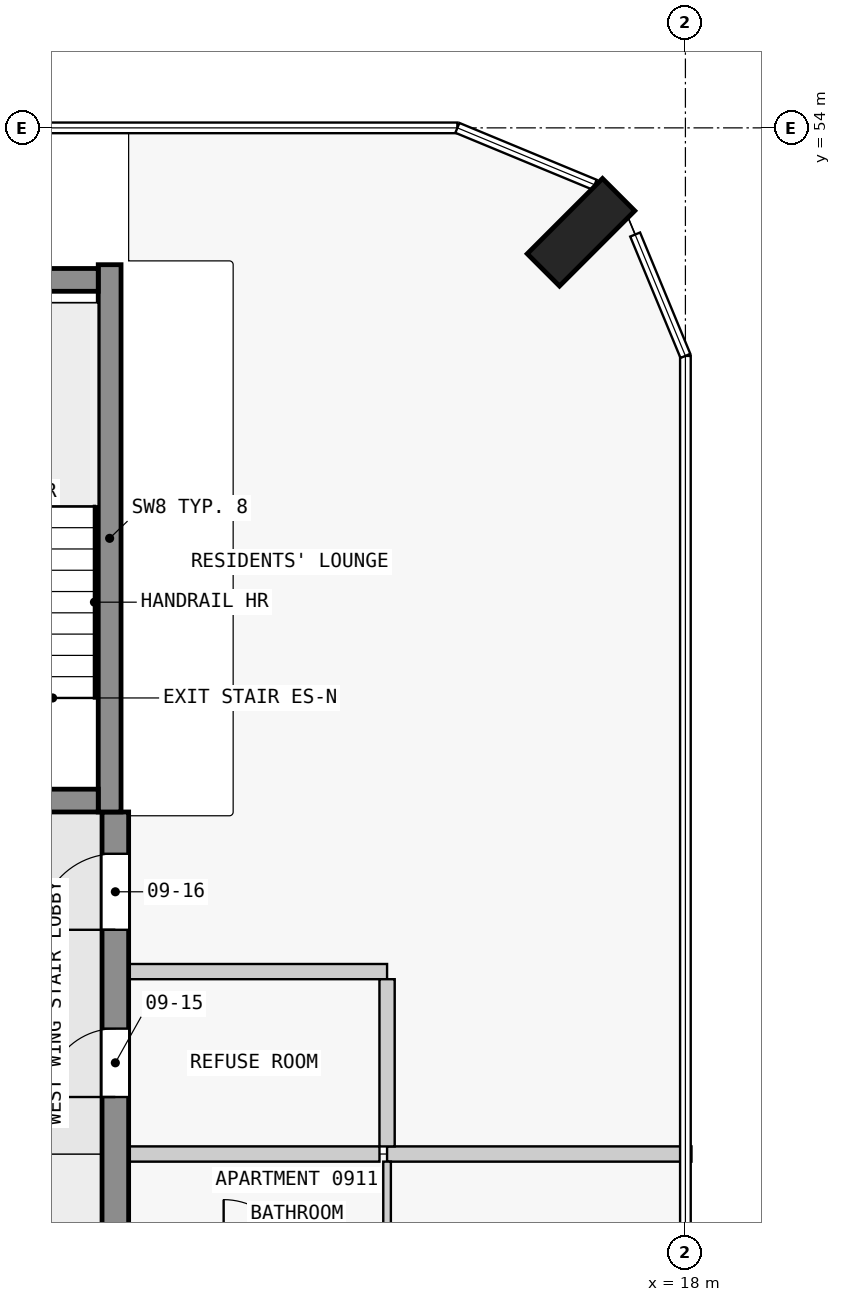
"""IFC4 building model, lengths in metres.
Left out: names, types, materials, properties, quantities, classifications, styles, units other than length and angle.
Written with IfcOpenShell. Run it as: python <this file> out.ifc"""

import sys

from ifc_helpers import new_model, si_unit, direction, frame, frame_2d, origin, origin_2d, place, context, subcontext, project, spatial, rectangle, extrude, element, fill, save


model = new_model("IFC4")
c1 = context("Model", 3, precision=1e-05, world=origin(), true_north=direction((0.0, 1.0)))
c2 = subcontext(c1, "Body", "Model", "MODEL_VIEW")
j1 = project(units=[si_unit("LENGTHUNIT", "METRE"), si_unit("PLANEANGLEUNIT", "RADIAN")], contexts=[c1])
p1 = place(None, origin())
s1 = spatial("IfcSite", under=j1, at=p1, CompositionType="ELEMENT")
p2 = place(p1, origin())
s2 = spatial("IfcBuilding", under=s1, at=p2, CompositionType="ELEMENT")
p3 = place(p2, frame((0.0, 0.0, 40.8)))
s3 = spatial("IfcBuildingStorey", under=s2, at=p3, CompositionType="ELEMENT", Elevation=40.8)
p4 = place(p3, frame((16.626, 52.626, 0.0), z_axis=(0.0, 0.0, 1.0), x_axis=(-0.707106781187, 0.707106781187, 0.0)))
e1 = element("IfcColumn", 1, at=p4, inside=s3, PredefinedType="COLUMN", context=c2, shape_type="SweptSolid", body=[
    extrude(rectangle(XDim=0.6, YDim=1.4, at=origin_2d()), origin(), (0.0, 0.0, 1.0), 3.5),
])
p5 = place(p3, frame((7.725, 45.15, 0.0), z_axis=(0.0, 0.0, 1.0), x_axis=(1.0, 0.0, 0.0)))
e2 = element("IfcWall", 2, at=p5, inside=s3, PredefinedType="SHEAR", context=c2, shape_type="SweptSolid", body=[
    extrude(rectangle(XDim=2.55, YDim=0.3, at=frame_2d((1.275, 0.0))), origin(), (0.0, 0.0, 1.0), 3.5),
])
p6 = place(p5, frame((0.725, 0.0, 0.0)))
e3 = element("IfcOpeningElement", 3, at=p6, cuts=e2, PredefinedType="OPENING", context=c2, shape_type="SweptSolid", body=[
    extrude(rectangle(XDim=1.1, YDim=2.1, at=frame_2d((0.55, 1.05))), frame((0.0, 0.16, 0.0), z_axis=(0.0, -1.0, 0.0), x_axis=(1.0, 0.0, 0.0)), (0.0, 0.0, 1.0), 0.32),
])
p7 = place(p3, frame((7.725, 52.0, 0.0), z_axis=(0.0, 0.0, 1.0), x_axis=(1.0, 0.0, 0.0)))
e4 = element("IfcWall", 4, at=p7, inside=s3, PredefinedType="SHEAR", context=c2, shape_type="SweptSolid", body=[
    extrude(rectangle(XDim=2.55, YDim=0.3, at=frame_2d((1.275, 0.0))), origin(), (0.0, 0.0, 1.0), 3.5),
])
p8 = place(p3, frame((10.425, 45.0, 0.0), z_axis=(0.0, 0.0, 1.0), x_axis=(0.0, 1.0, 0.0)))
e5 = element("IfcWall", 5, at=p8, inside=s3, PredefinedType="SHEAR", context=c2, shape_type="SweptSolid", body=[
    extrude(rectangle(XDim=7.2, YDim=0.3, at=frame_2d((3.6, 0.0))), origin(), (0.0, 0.0, 1.0), 3.5),
])
p9 = place(p3, frame((10.5, 18.0, 0.0), z_axis=(0.0, 0.0, 1.0), x_axis=(0.0, 1.0, 0.0)))
e6 = element("IfcWall", 6, at=p9, inside=s3, PredefinedType="SHEAR", context=c2, shape_type="SweptSolid", body=[
    extrude(rectangle(XDim=27.0, YDim=0.35, at=frame_2d((13.5, 0.0))), origin(), (0.0, 0.0, 1.0), 3.25),
])
p10 = place(p9, frame((7.45, 0.0, 0.0)))
e7 = element("IfcOpeningElement", 7, at=p10, cuts=e6, PredefinedType="OPENING", context=c2, shape_type="SweptSolid", body=[
    extrude(rectangle(XDim=1.0, YDim=2.1, at=frame_2d((0.5, 1.05))), frame((0.0, 0.185, 0.0), z_axis=(0.0, -1.0, 0.0), x_axis=(1.0, 0.0, 0.0)), (0.0, 0.0, 1.0), 0.37),
])
p11 = place(p9, frame((19.75, 0.0, 0.0)))
e8 = element("IfcOpeningElement", 8, at=p11, cuts=e6, PredefinedType="OPENING", context=c2, shape_type="SweptSolid", body=[
    extrude(rectangle(XDim=1.0, YDim=2.1, at=frame_2d((0.5, 1.05))), frame((0.0, 0.185, 0.0), z_axis=(0.0, -1.0, 0.0), x_axis=(1.0, 0.0, 0.0)), (0.0, 0.0, 1.0), 0.37),
])
p12 = place(p9, frame((23.25, 0.0, 0.0)))
e9 = element("IfcOpeningElement", 9, at=p12, cuts=e6, PredefinedType="OPENING", context=c2, shape_type="SweptSolid", body=[
    extrude(rectangle(XDim=0.9, YDim=2.1, at=frame_2d((0.45, 1.05))), frame((0.0, 0.185, 0.0), z_axis=(0.0, -1.0, 0.0), x_axis=(1.0, 0.0, 0.0)), (0.0, 0.0, 1.0), 0.37),
])
p13 = place(p9, frame((25.45, 0.0, 0.0)))
e10 = element("IfcOpeningElement", 10, at=p13, cuts=e6, PredefinedType="OPENING", context=c2, shape_type="SweptSolid", body=[
    extrude(rectangle(XDim=1.0, YDim=2.1, at=frame_2d((0.5, 1.05))), frame((0.0, 0.185, 0.0), z_axis=(0.0, -1.0, 0.0), x_axis=(1.0, 0.0, 0.0)), (0.0, 0.0, 1.0), 0.37),
])
p14 = place(p3, frame((13.975, 40.5, 0.0), z_axis=(0.0, 0.0, 1.0), x_axis=(-1.0, 0.0, 0.0)))
e11 = element("IfcWall", 11, at=p14, inside=s3, PredefinedType="PARTITIONING", context=c2, shape_type="SweptSolid", body=[
    extrude(rectangle(XDim=3.3, YDim=0.2, at=frame_2d((1.65, 0.0))), origin(), (0.0, 0.0, 1.0), 3.25),
])
p15 = place(p3, frame((14.075, 40.5, 0.0), z_axis=(0.0, 0.0, 1.0), x_axis=(1.0, 0.0, 0.0)))
e12 = element("IfcWall", 12, at=p15, inside=s3, PredefinedType="PARTITIONING", context=c2, shape_type="SweptSolid", body=[
    extrude(rectangle(XDim=4.005, YDim=0.2, at=frame_2d((2.002, 0.0))), origin(), (0.0, 0.0, 1.0), 3.25),
])
p16 = place(p3, frame((14.075, 42.9, 0.0), z_axis=(0.0, 0.0, 1.0), x_axis=(-1.0, 0.0, 0.0)))
e13 = element("IfcWall", 13, at=p16, inside=s3, PredefinedType="PARTITIONING", context=c2, shape_type="SweptSolid", body=[
    extrude(rectangle(XDim=3.4, YDim=0.2, at=frame_2d((1.7, 0.0))), origin(), (0.0, 0.0, 1.0), 3.25),
])
p17 = place(p3, frame((14.075, 39.05, 0.0), z_axis=(0.0, 0.0, 1.0), x_axis=(0.0, 1.0, 0.0)))
e14 = element("IfcWall", 14, at=p17, inside=s3, PredefinedType="PARTITIONING", context=c2, shape_type="SweptSolid", body=[
    extrude(rectangle(XDim=1.35, YDim=0.1, at=frame_2d((0.675, 0.0))), origin(), (0.0, 0.0, 1.0), 3.25),
])
p18 = place(p3, frame((14.075, 40.6, 0.0), z_axis=(0.0, 0.0, 1.0), x_axis=(0.0, 1.0, 0.0)))
e15 = element("IfcWall", 15, at=p18, inside=s3, PredefinedType="PARTITIONING", context=c2, shape_type="SweptSolid", body=[
    extrude(rectangle(XDim=2.2, YDim=0.2, at=frame_2d((1.1, 0.0))), origin(), (0.0, 0.0, 1.0), 3.25),
])
p19 = place(p12, origin())
e16 = element("IfcDoor", 16, at=p19, inside=s3, OperationType="SINGLE_SWING_RIGHT", PredefinedType="DOOR", context=c2, shape_type="SweptSolid", body=[
    extrude(rectangle(XDim=0.9, YDim=2.1, at=frame_2d((0.45, 1.05))), frame((0.0, 0.025, 0.0), z_axis=(0.0, -1.0, 0.0), x_axis=(1.0, 0.0, 0.0)), (0.0, 0.0, 1.0), 0.05),
])
fill(e9, e16)
p20 = place(p13, origin())
e17 = element("IfcDoor", 17, at=p20, inside=s3, OperationType="SINGLE_SWING_RIGHT", PredefinedType="DOOR", context=c2, shape_type="SweptSolid", body=[
    extrude(rectangle(XDim=1.0, YDim=2.1, at=frame_2d((0.5, 1.05))), frame((0.0, 0.025, 0.0), z_axis=(0.0, -1.0, 0.0), x_axis=(1.0, 0.0, 0.0)), (0.0, 0.0, 1.0), 0.05),
])
fill(e10, e17)
save(model, sys.argv[1])
